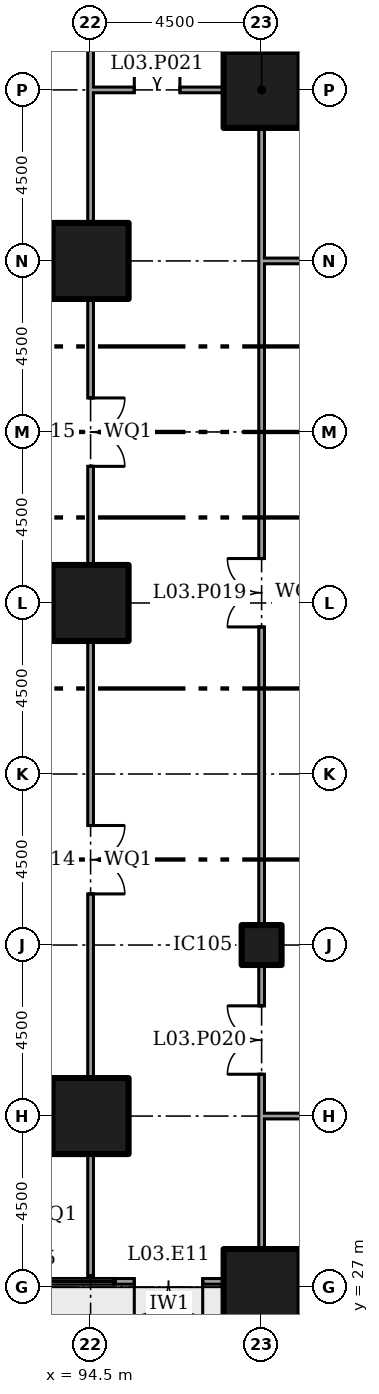
"""IFC4 building model, lengths in metres.
Left out: names, types, materials, properties, quantities, classifications, styles, units other than length and angle.
Written with IfcOpenShell. Run it as: python <this file> out.ifc"""

import sys

from ifc_helpers import new_model, si_unit, direction, frame, frame_2d, origin, origin_2d, place, context, subcontext, project, spatial, rectangle, extrude, element, fill, save


model = new_model("IFC4")
c1 = context("Model", 3, precision=1e-05, world=origin(), true_north=direction((0.0, 1.0)))
c2 = subcontext(c1, "Body", "Model", "MODEL_VIEW")
j1 = project(units=[si_unit("LENGTHUNIT", "METRE"), si_unit("PLANEANGLEUNIT", "RADIAN")], contexts=[c1])
p1 = place(None, origin())
s1 = spatial("IfcSite", under=j1, at=p1, CompositionType="ELEMENT")
p2 = place(p1, origin())
s2 = spatial("IfcBuilding", under=s1, at=p2, CompositionType="ELEMENT")
p3 = place(p2, frame((0.0, 0.0, 16.5)))
s3 = spatial("IfcBuildingStorey", under=s2, at=p3, CompositionType="ELEMENT", Elevation=16.5)
for number, where in (
    (1, (94.5, 31.5, 0.0)),
    (2, (94.5, 45.0, 0.0)),
    (3, (94.5, 54.0, 0.0)),
    (4, (99.0, 27.0, 0.0)),
    (5, (99.0, 58.5, 0.0)),
):
    element("IfcColumn", number, at=place(p3, frame(where)), inside=s3, PredefinedType="COLUMN", context=c2, shape_type="SweptSolid", body=[
        extrude(rectangle(XDim=2.0, YDim=2.0, at=origin_2d()), origin(), (0.0, 0.0, 1.0), 4.5),
    ])
p4 = place(p3, frame((99.0, 36.0, 0.0)))
e6 = element("IfcColumn", 6, at=p4, inside=s3, PredefinedType="COLUMN", context=c2, shape_type="SweptSolid", body=[
    extrude(rectangle(XDim=1.05, YDim=1.05, at=origin_2d()), origin(), (0.0, 0.0, 1.0), 4.5),
])
p5 = place(p3, frame((95.15, 27.15, 0.0)))
e7 = element("IfcWall", 7, at=p5, inside=s3, PredefinedType="SOLIDWALL", context=c2, shape_type="SweptSolid", body=[
    extrude(rectangle(XDim=2.85, YDim=0.15, at=frame_2d((1.425, 0.0))), origin(), (0.0, 0.0, 1.0), 4.05),
])
p6 = place(p5, frame((0.5, 0.0, 0.0)))
e8 = element("IfcOpeningElement", 8, at=p6, cuts=e7, PredefinedType="OPENING", context=c2, shape_type="SweptSolid", body=[
    extrude(rectangle(XDim=1.8, YDim=2.4, at=frame_2d((0.9, 1.2))), frame((0.0, 0.085, 0.0), z_axis=(0.0, -1.0, 0.0), x_axis=(1.0, 0.0, 0.0)), (0.0, 0.0, 1.0), 0.17),
])
p7 = place(p3, frame((94.5, 27.3, 0.0), z_axis=(0.0, 0.0, 1.0), x_axis=(0.0, 1.0, 0.0)))
e9 = element("IfcWall", 9, at=p7, inside=s3, PredefinedType="PARTITIONING", context=c2, shape_type="SweptSolid", body=[
    extrude(rectangle(XDim=3.205, YDim=0.15, at=frame_2d((1.603, 0.0))), origin(), (0.0, 0.0, 1.0), 4.05),
])
p8 = place(p3, frame((94.5, 32.495, 0.0), z_axis=(0.0, 0.0, 1.0), x_axis=(0.0, 1.0, 0.0)))
e10 = element("IfcWall", 10, at=p8, inside=s3, PredefinedType="PARTITIONING", context=c2, shape_type="SweptSolid", body=[
    extrude(rectangle(XDim=11.51, YDim=0.15, at=frame_2d((5.755, 0.0))), origin(), (0.0, 0.0, 1.0), 2.25),
])
p9 = place(p8, frame((4.85, 0.0, 0.0)))
e11 = element("IfcOpeningElement", 11, at=p9, cuts=e10, PredefinedType="OPENING", context=c2, shape_type="SweptSolid", body=[
    extrude(rectangle(XDim=1.8, YDim=2.1, at=frame_2d((0.9, 1.05))), frame((0.0, 0.085, 0.0), z_axis=(0.0, -1.0, 0.0), x_axis=(1.0, 0.0, 0.0)), (0.0, 0.0, 1.0), 0.17),
])
p10 = place(p3, frame((94.5, 45.995, 0.0), z_axis=(0.0, 0.0, 1.0), x_axis=(0.0, 1.0, 0.0)))
e12 = element("IfcWall", 12, at=p10, inside=s3, PredefinedType="PARTITIONING", context=c2, shape_type="SweptSolid", body=[
    extrude(rectangle(XDim=7.01, YDim=0.15, at=frame_2d((3.505, 0.0))), origin(), (0.0, 0.0, 1.0), 2.25),
])
p11 = place(p10, frame((2.6, 0.0, 0.0)))
e13 = element("IfcOpeningElement", 13, at=p11, cuts=e12, PredefinedType="OPENING", context=c2, shape_type="SweptSolid", body=[
    extrude(rectangle(XDim=1.8, YDim=2.1, at=frame_2d((0.9, 1.05))), frame((0.0, 0.085, 0.0), z_axis=(0.0, -1.0, 0.0), x_axis=(1.0, 0.0, 0.0)), (0.0, 0.0, 1.0), 0.17),
])
p12 = place(p3, frame((94.5, 54.995, 0.0), z_axis=(0.0, 0.0, 1.0), x_axis=(0.0, 1.0, 0.0)))
e14 = element("IfcWall", 14, at=p12, inside=s3, PredefinedType="PARTITIONING", context=c2, shape_type="SweptSolid", body=[
    extrude(rectangle(XDim=3.58, YDim=0.15, at=frame_2d((1.79, 0.0))), origin(), (0.0, 0.0, 1.0), 4.05),
])
p13 = place(p3, frame((94.5, 58.5, 0.0), z_axis=(0.0, 0.0, 1.0), x_axis=(0.0, 1.0, 0.0)))
e15 = element("IfcWall", 15, at=p13, inside=s3, PredefinedType="PARTITIONING", context=c2, shape_type="SweptSolid", body=[
    extrude(rectangle(XDim=3.825, YDim=0.15, at=frame_2d((1.913, 0.0))), origin(), (0.0, 0.0, 1.0), 4.05),
])
p14 = place(p13, frame((1.25, 0.0, 0.0)))
e16 = element("IfcOpeningElement", 16, at=p14, cuts=e15, PredefinedType="OPENING", context=c2, shape_type="SweptSolid", body=[
    extrude(rectangle(XDim=1.2, YDim=2.1, at=frame_2d((0.6, 1.05))), frame((0.0, 0.085, 0.0), z_axis=(0.0, -1.0, 0.0), x_axis=(1.0, 0.0, 0.0)), (0.0, 0.0, 1.0), 0.17),
])
p15 = place(p3, frame((99.0, 31.425, 0.0), z_axis=(0.0, 0.0, 1.0), x_axis=(0.0, 1.0, 0.0)))
e17 = element("IfcWall", 17, at=p15, inside=s3, PredefinedType="PARTITIONING", context=c2, shape_type="SweptSolid", body=[
    extrude(rectangle(XDim=4.055, YDim=0.15, at=frame_2d((2.027, 0.0))), origin(), (0.0, 0.0, 1.0), 4.05),
])
p16 = place(p15, frame((1.175, 0.0, 0.0)))
e18 = element("IfcOpeningElement", 18, at=p16, cuts=e17, PredefinedType="OPENING", context=c2, shape_type="SweptSolid", body=[
    extrude(rectangle(XDim=1.8, YDim=2.1, at=frame_2d((0.9, 1.05))), frame((0.0, 0.085, 0.0), z_axis=(0.0, -1.0, 0.0), x_axis=(1.0, 0.0, 0.0)), (0.0, 0.0, 1.0), 0.17),
])
p17 = place(p3, frame((99.0, 36.52, 0.0), z_axis=(0.0, 0.0, 1.0), x_axis=(0.0, 1.0, 0.0)))
e19 = element("IfcWall", 19, at=p17, inside=s3, PredefinedType="PARTITIONING", context=c2, shape_type="SweptSolid", body=[
    extrude(rectangle(XDim=17.555, YDim=0.15, at=frame_2d((8.777, 0.0))), origin(), (0.0, 0.0, 1.0), 4.05),
])
p18 = place(p17, frame((7.85, 0.0, 0.0)))
e20 = element("IfcOpeningElement", 20, at=p18, cuts=e19, PredefinedType="OPENING", context=c2, shape_type="SweptSolid", body=[
    extrude(rectangle(XDim=1.8, YDim=2.1, at=frame_2d((0.9, 1.05))), frame((0.0, 0.085, 0.0), z_axis=(0.0, -1.0, 0.0), x_axis=(1.0, 0.0, 0.0)), (0.0, 0.0, 1.0), 0.17),
])
for number, where, z_axis, x_axis in (
    (21, (99.0, 27.995, 0.0), (0.0, 0.0, 1.0), (0.0, 1.0, 0.0)),
    (22, (99.0, 54.0, 0.0), (0.0, 0.0, 1.0), (0.0, 1.0, 0.0)),
):
    element("IfcWall", number, at=place(p3, frame(where, z_axis=z_axis, x_axis=x_axis)), inside=s3, PredefinedType="PARTITIONING", context=c2, shape_type="SweptSolid", body=[
        extrude(rectangle(XDim=3.505, YDim=0.15, at=frame_2d((1.752, 0.0))), origin(), (0.0, 0.0, 1.0), 4.05),
    ])
p19 = place(p3, frame((94.575, 58.5, 0.0)))
e23 = element("IfcWall", 23, at=p19, inside=s3, PredefinedType="PARTITIONING", context=c2, shape_type="SweptSolid", body=[
    extrude(rectangle(XDim=3.43, YDim=0.15, at=frame_2d((1.715, 0.0))), origin(), (0.0, 0.0, 1.0), 4.05),
])
p20 = place(p19, frame((1.075, 0.0, 0.0)))
e24 = element("IfcOpeningElement", 24, at=p20, cuts=e23, PredefinedType="OPENING", context=c2, shape_type="SweptSolid", body=[
    extrude(rectangle(XDim=1.2, YDim=2.1, at=frame_2d((0.6, 1.05))), frame((0.0, 0.085, 0.0), z_axis=(0.0, -1.0, 0.0), x_axis=(1.0, 0.0, 0.0)), (0.0, 0.0, 1.0), 0.17),
])
p21 = place(p3, frame((99.075, 31.5, 0.0)))
e25 = element("IfcWall", 25, at=p21, inside=s3, PredefinedType="PARTITIONING", context=c2, shape_type="SweptSolid", body=[
    extrude(rectangle(XDim=17.405, YDim=0.15, at=frame_2d((8.703, 0.0))), origin(), (0.0, 0.0, 1.0), 4.05),
])
p22 = place(p21, frame((8.175, 0.0, 0.0)))
e26 = element("IfcOpeningElement", 26, at=p22, cuts=e25, PredefinedType="OPENING", context=c2, shape_type="SweptSolid", body=[
    extrude(rectangle(XDim=1.0, YDim=2.1, at=frame_2d((0.5, 1.05))), frame((0.0, 0.085, 0.0), z_axis=(0.0, -1.0, 0.0), x_axis=(1.0, 0.0, 0.0)), (0.0, 0.0, 1.0), 0.17),
])
p23 = place(p3, frame((99.075, 54.0, 0.0)))
e27 = element("IfcWall", 27, at=p23, inside=s3, PredefinedType="PARTITIONING", context=c2, shape_type="SweptSolid", body=[
    extrude(rectangle(XDim=3.905, YDim=0.15, at=frame_2d((1.953, 0.0))), origin(), (0.0, 0.0, 1.0), 4.05),
])
p24 = place(p3, frame((99.995, 58.5, 0.0)))
e28 = element("IfcWall", 28, at=p24, inside=s3, PredefinedType="PARTITIONING", context=c2, shape_type="SweptSolid", body=[
    extrude(rectangle(XDim=11.51, YDim=0.15, at=frame_2d((5.755, 0.0))), origin(), (0.0, 0.0, 1.0), 2.25),
])
p25 = place(p6, frame((1.8, 0.0, 0.0), x_axis=(-1.0, 0.0, 0.0)))
e29 = element("IfcDoor", 29, at=p25, inside=s3, OperationType="DOUBLE_DOOR_DOUBLE_SWING", PredefinedType="NOTDEFINED", context=c2, shape_type="SweptSolid", body=[
    extrude(rectangle(XDim=1.8, YDim=2.4, at=frame_2d((0.9, 1.2))), frame((0.0, 0.025, 0.0), z_axis=(0.0, -1.0, 0.0), x_axis=(1.0, 0.0, 0.0)), (0.0, 0.0, 1.0), 0.05),
])
fill(e8, e29)
p26 = place(p9, frame((1.8, 0.0, 0.0), x_axis=(-1.0, 0.0, 0.0)))
e30 = element("IfcDoor", 30, at=p26, inside=s3, OperationType="DOUBLE_DOOR_SINGLE_SWING", PredefinedType="DOOR", context=c2, shape_type="SweptSolid", body=[
    extrude(rectangle(XDim=1.8, YDim=2.1, at=frame_2d((0.9, 1.05))), frame((0.0, 0.025, 0.0), z_axis=(0.0, -1.0, 0.0), x_axis=(1.0, 0.0, 0.0)), (0.0, 0.0, 1.0), 0.05),
])
fill(e11, e30)
p27 = place(p11, frame((1.8, 0.0, 0.0), x_axis=(-1.0, 0.0, 0.0)))
e31 = element("IfcDoor", 31, at=p27, inside=s3, OperationType="DOUBLE_DOOR_SINGLE_SWING", PredefinedType="DOOR", context=c2, shape_type="SweptSolid", body=[
    extrude(rectangle(XDim=1.8, YDim=2.1, at=frame_2d((0.9, 1.05))), frame((0.0, 0.025, 0.0), z_axis=(0.0, -1.0, 0.0), x_axis=(1.0, 0.0, 0.0)), (0.0, 0.0, 1.0), 0.05),
])
fill(e13, e31)
p28 = place(p18, origin())
e32 = element("IfcDoor", 32, at=p28, inside=s3, OperationType="DOUBLE_DOOR_SINGLE_SWING", PredefinedType="DOOR", context=c2, shape_type="SweptSolid", body=[
    extrude(rectangle(XDim=1.8, YDim=2.1, at=frame_2d((0.9, 1.05))), frame((0.0, 0.025, 0.0), z_axis=(0.0, -1.0, 0.0), x_axis=(1.0, 0.0, 0.0)), (0.0, 0.0, 1.0), 0.05),
])
fill(e20, e32)
p29 = place(p16, origin())
e33 = element("IfcDoor", 33, at=p29, inside=s3, OperationType="DOUBLE_DOOR_SINGLE_SWING", PredefinedType="DOOR", context=c2, shape_type="SweptSolid", body=[
    extrude(rectangle(XDim=1.8, YDim=2.1, at=frame_2d((0.9, 1.05))), frame((0.0, 0.025, 0.0), z_axis=(0.0, -1.0, 0.0), x_axis=(1.0, 0.0, 0.0)), (0.0, 0.0, 1.0), 0.05),
])
fill(e18, e33)
p30 = place(p20, origin())
e34 = element("IfcDoor", 34, at=p30, inside=s3, OperationType="DOUBLE_DOOR_SINGLE_SWING", PredefinedType="DOOR", context=c2, shape_type="SweptSolid", body=[
    extrude(rectangle(XDim=1.2, YDim=2.1, at=frame_2d((0.6, 1.05))), frame((0.0, 0.025, 0.0), z_axis=(0.0, -1.0, 0.0), x_axis=(1.0, 0.0, 0.0)), (0.0, 0.0, 1.0), 0.05),
])
fill(e24, e34)
save(model, sys.argv[1])
